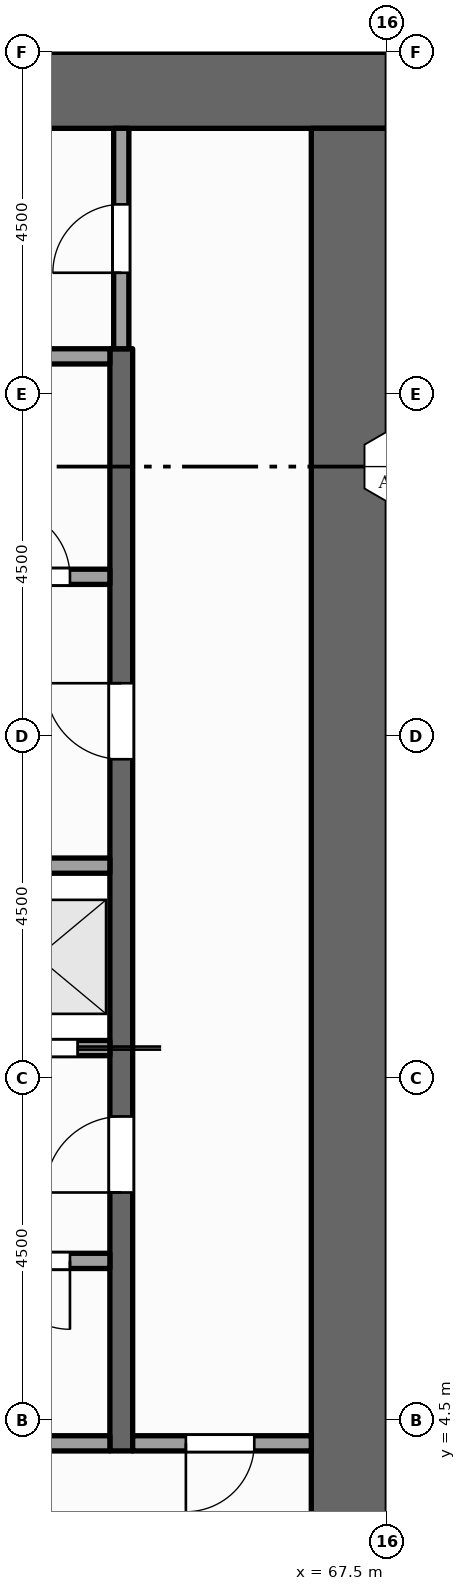
"""IFC4 building model, lengths in metres.
Left out: names, types, materials, properties, quantities, classifications, styles, units other than length and angle.
Written with IfcOpenShell. Run it as: python <this file> out.ifc"""

import sys

from ifc_helpers import new_model, si_unit, direction, frame, frame_2d, origin, place, context, subcontext, project, spatial, rectangle, extrude, element, fill, save


model = new_model("IFC4")
c1 = context("Model", 3, precision=1e-05, world=origin(), true_north=direction((0.0, 1.0)))
c2 = subcontext(c1, "Body", "Model", "MODEL_VIEW")
j1 = project(units=[si_unit("LENGTHUNIT", "METRE"), si_unit("PLANEANGLEUNIT", "RADIAN")], contexts=[c1])
p1 = place(None, origin())
s1 = spatial("IfcSite", under=j1, at=p1, CompositionType="ELEMENT")
p2 = place(p1, origin())
s2 = spatial("IfcBuilding", under=s1, at=p2, CompositionType="ELEMENT")
p3 = place(p2, frame((0.0, 0.0, 187.0)))
s3 = spatial("IfcBuildingStorey", under=s2, at=p3, CompositionType="ELEMENT", Elevation=187.0)
p4 = place(p3, frame((54.0, 22.0, -0.15), z_axis=(0.0, 0.0, 1.0), x_axis=(1.0, 0.0, 0.0)))
e1 = element("IfcWall", 1, at=p4, inside=s3, PredefinedType="SHEAR", context=c2, shape_type="SweptSolid", body=[
    extrude(rectangle(XDim=13.5, YDim=1.0, at=frame_2d((6.75, 0.0))), origin(), (0.0, 0.0, 1.0), 8.0),
])
p5 = place(p3, frame((67.0, 1.0, -0.15), z_axis=(0.0, 0.0, 1.0), x_axis=(0.0, 1.0, 0.0)))
e2 = element("IfcWall", 2, at=p5, inside=s3, PredefinedType="SHEAR", context=c2, shape_type="SweptSolid", body=[
    extrude(rectangle(XDim=20.5, YDim=1.0, at=frame_2d((10.25, 0.0))), origin(), (0.0, 0.0, 1.0), 8.0),
])
p6 = place(p3, frame((64.0, 4.1, 0.0), z_axis=(0.0, 0.0, 1.0), x_axis=(0.0, 1.0, 0.0)))
e3 = element("IfcWall", 3, at=p6, inside=s3, PredefinedType="SHEAR", context=c2, shape_type="SweptSolid", body=[
    extrude(rectangle(XDim=14.5, YDim=0.3, at=frame_2d((7.25, 0.0))), origin(), (0.0, 0.0, 1.0), 7.85),
])
p7 = place(p6, frame((3.4, 0.0, 0.0)))
e4 = element("IfcOpeningElement", 4, at=p7, cuts=e3, PredefinedType="OPENING", context=c2, shape_type="SweptSolid", body=[
    extrude(rectangle(XDim=1.0, YDim=2.1, at=frame_2d((0.5, 1.05))), frame((0.0, 0.16, 0.0), z_axis=(0.0, -1.0, 0.0), x_axis=(1.0, 0.0, 0.0)), (0.0, 0.0, 1.0), 0.32),
])
p8 = place(p6, frame((9.1, 0.0, 0.0)))
e5 = element("IfcOpeningElement", 5, at=p8, cuts=e3, PredefinedType="OPENING", context=c2, shape_type="SweptSolid", body=[
    extrude(rectangle(XDim=1.0, YDim=2.1, at=frame_2d((0.5, 1.05))), frame((0.0, 0.16, 0.0), z_axis=(0.0, -1.0, 0.0), x_axis=(1.0, 0.0, 0.0)), (0.0, 0.0, 1.0), 0.32),
])
p9 = place(p3, frame((64.0, 18.6, 0.0), z_axis=(0.0, 0.0, 1.0), x_axis=(0.0, 1.0, 0.0)))
e6 = element("IfcWall", 6, at=p9, inside=s3, PredefinedType="PARTITIONING", context=c2, shape_type="SweptSolid", body=[
    extrude(rectangle(XDim=2.9, YDim=0.2, at=frame_2d((1.45, 0.0))), origin(), (0.0, 0.0, 1.0), 7.85),
])
p10 = place(p9, frame((1.0, 0.0, 0.0)))
e7 = element("IfcOpeningElement", 7, at=p10, cuts=e6, PredefinedType="OPENING", context=c2, shape_type="SweptSolid", body=[
    extrude(rectangle(XDim=0.9, YDim=2.1, at=frame_2d((0.45, 1.05))), frame((0.0, 0.11, 0.0), z_axis=(0.0, -1.0, 0.0), x_axis=(1.0, 0.0, 0.0)), (0.0, 0.0, 1.0), 0.22),
])
p11 = place(p3, frame((61.9, 4.2, 0.0), z_axis=(0.0, 0.0, 1.0), x_axis=(1.0, 0.0, 0.0)))
e8 = element("IfcWall", 8, at=p11, inside=s3, PredefinedType="PARTITIONING", context=c2, shape_type="SweptSolid", body=[
    extrude(rectangle(XDim=1.95, YDim=0.2, at=frame_2d((0.975, 0.0))), origin(), (0.0, 0.0, 1.0), 7.85),
])
p12 = place(p3, frame((64.15, 4.2, 0.0), z_axis=(0.0, 0.0, 1.0), x_axis=(1.0, 0.0, 0.0)))
e9 = element("IfcWall", 9, at=p12, inside=s3, PredefinedType="PARTITIONING", context=c2, shape_type="SweptSolid", body=[
    extrude(rectangle(XDim=2.35, YDim=0.2, at=frame_2d((1.175, 0.0))), origin(), (0.0, 0.0, 1.0), 7.85),
])
p13 = place(p12, frame((0.7, 0.0, 0.0)))
e10 = element("IfcOpeningElement", 10, at=p13, cuts=e9, PredefinedType="OPENING", context=c2, shape_type="SweptSolid", body=[
    extrude(rectangle(XDim=0.9, YDim=2.1, at=frame_2d((0.45, 1.05))), frame((0.0, 0.11, 0.0), z_axis=(0.0, -1.0, 0.0), x_axis=(1.0, 0.0, 0.0)), (0.0, 0.0, 1.0), 0.22),
])
p14 = place(p3, frame((61.9, 6.6, 0.0), z_axis=(0.0, 0.0, 1.0), x_axis=(1.0, 0.0, 0.0)))
e11 = element("IfcWall", 11, at=p14, inside=s3, PredefinedType="PARTITIONING", context=c2, shape_type="SweptSolid", body=[
    extrude(rectangle(XDim=1.95, YDim=0.2, at=frame_2d((0.975, 0.0))), origin(), (0.0, 0.0, 1.0), 7.85),
])
p15 = place(p14, frame((0.525, 0.0, 0.0)))
e12 = element("IfcOpeningElement", 12, at=p15, cuts=e11, PredefinedType="OPENING", context=c2, shape_type="SweptSolid", body=[
    extrude(rectangle(XDim=0.9, YDim=2.1, at=frame_2d((0.45, 1.05))), frame((0.0, 0.11, 0.0), z_axis=(0.0, -1.0, 0.0), x_axis=(1.0, 0.0, 0.0)), (0.0, 0.0, 1.0), 0.22),
])
p16 = place(p3, frame((61.9, 9.4, 0.0), z_axis=(0.0, 0.0, 1.0), x_axis=(1.0, 0.0, 0.0)))
e13 = element("IfcWall", 13, at=p16, inside=s3, PredefinedType="SOLIDWALL", context=c2, shape_type="SweptSolid", body=[
    extrude(rectangle(XDim=1.95, YDim=0.2, at=frame_2d((0.975, 0.0))), origin(), (0.0, 0.0, 1.0), 7.85),
])
p17 = place(p16, frame((0.425, 0.0, 0.012)))
e14 = element("IfcOpeningElement", 14, at=p17, cuts=e13, PredefinedType="OPENING", context=c2, shape_type="SweptSolid", body=[
    extrude(rectangle(XDim=1.1, YDim=2.1, at=frame_2d((0.55, 1.05))), frame((0.0, 0.11, 0.0), z_axis=(0.0, -1.0, 0.0), x_axis=(1.0, 0.0, 0.0)), (0.0, 0.0, 1.0), 0.22),
])
p18 = place(p3, frame((61.9, 11.8, 0.0), z_axis=(0.0, 0.0, 1.0), x_axis=(1.0, 0.0, 0.0)))
e15 = element("IfcWall", 15, at=p18, inside=s3, PredefinedType="SOLIDWALL", context=c2, shape_type="SweptSolid", body=[
    extrude(rectangle(XDim=1.95, YDim=0.2, at=frame_2d((0.975, 0.0))), origin(), (0.0, 0.0, 1.0), 7.85),
])
p19 = place(p3, frame((61.9, 15.6, 0.0), z_axis=(0.0, 0.0, 1.0), x_axis=(1.0, 0.0, 0.0)))
e16 = element("IfcWall", 16, at=p19, inside=s3, PredefinedType="PARTITIONING", context=c2, shape_type="SweptSolid", body=[
    extrude(rectangle(XDim=1.95, YDim=0.2, at=frame_2d((0.975, 0.0))), origin(), (0.0, 0.0, 1.0), 7.85),
])
p20 = place(p19, frame((0.525, 0.0, 0.0)))
e17 = element("IfcOpeningElement", 17, at=p20, cuts=e16, PredefinedType="OPENING", context=c2, shape_type="SweptSolid", body=[
    extrude(rectangle(XDim=0.9, YDim=2.1, at=frame_2d((0.45, 1.05))), frame((0.0, 0.11, 0.0), z_axis=(0.0, -1.0, 0.0), x_axis=(1.0, 0.0, 0.0)), (0.0, 0.0, 1.0), 0.22),
])
p21 = place(p3, frame((61.9, 18.5, 0.0), z_axis=(0.0, 0.0, 1.0), x_axis=(1.0, 0.0, 0.0)))
e18 = element("IfcWall", 18, at=p21, inside=s3, PredefinedType="PARTITIONING", context=c2, shape_type="SweptSolid", body=[
    extrude(rectangle(XDim=1.95, YDim=0.2, at=frame_2d((0.975, 0.0))), origin(), (0.0, 0.0, 1.0), 7.85),
])
p22 = place(p17, origin())
e19 = element("IfcDoor", 19, at=p22, inside=s3, OperationType="SLIDING_TO_RIGHT", PredefinedType="DOOR", context=c2, shape_type="SweptSolid", body=[
    extrude(rectangle(XDim=1.1, YDim=2.1, at=frame_2d((0.55, 1.05))), frame((0.0, 0.025, 0.0), z_axis=(0.0, -1.0, 0.0), x_axis=(1.0, 0.0, 0.0)), (0.0, 0.0, 1.0), 0.05),
])
fill(e14, e19)
p23 = place(p7, origin())
e20 = element("IfcDoor", 20, at=p23, inside=s3, OperationType="SINGLE_SWING_LEFT", PredefinedType="DOOR", context=c2, shape_type="SweptSolid", body=[
    extrude(rectangle(XDim=1.0, YDim=2.1, at=frame_2d((0.5, 1.05))), frame((0.0, 0.025, 0.0), z_axis=(0.0, -1.0, 0.0), x_axis=(1.0, 0.0, 0.0)), (0.0, 0.0, 1.0), 0.05),
])
fill(e4, e20)
p24 = place(p8, origin())
e21 = element("IfcDoor", 21, at=p24, inside=s3, OperationType="SINGLE_SWING_RIGHT", PredefinedType="DOOR", context=c2, shape_type="SweptSolid", body=[
    extrude(rectangle(XDim=1.0, YDim=2.1, at=frame_2d((0.5, 1.05))), frame((0.0, 0.025, 0.0), z_axis=(0.0, -1.0, 0.0), x_axis=(1.0, 0.0, 0.0)), (0.0, 0.0, 1.0), 0.05),
])
fill(e5, e21)
p25 = place(p13, origin())
e22 = element("IfcDoor", 22, at=p25, inside=s3, OperationType="SINGLE_SWING_LEFT", PredefinedType="DOOR", context=c2, shape_type="SweptSolid", body=[
    extrude(rectangle(XDim=0.9, YDim=2.1, at=frame_2d((0.45, 1.05))), frame((0.0, 0.025, 0.0), z_axis=(0.0, -1.0, 0.0), x_axis=(1.0, 0.0, 0.0)), (0.0, 0.0, 1.0), 0.05),
])
fill(e10, e22)
p26 = place(p10, origin())
e23 = element("IfcDoor", 23, at=p26, inside=s3, OperationType="SINGLE_SWING_LEFT", PredefinedType="DOOR", context=c2, shape_type="SweptSolid", body=[
    extrude(rectangle(XDim=0.9, YDim=2.1, at=frame_2d((0.45, 1.05))), frame((0.0, 0.025, 0.0), z_axis=(0.0, -1.0, 0.0), x_axis=(1.0, 0.0, 0.0)), (0.0, 0.0, 1.0), 0.05),
])
fill(e7, e23)
p27 = place(p15, origin())
e24 = element("IfcDoor", 24, at=p27, inside=s3, OperationType="SINGLE_SWING_RIGHT", PredefinedType="DOOR", context=c2, shape_type="SweptSolid", body=[
    extrude(rectangle(XDim=0.9, YDim=2.1, at=frame_2d((0.45, 1.05))), frame((0.0, 0.025, 0.0), z_axis=(0.0, -1.0, 0.0), x_axis=(1.0, 0.0, 0.0)), (0.0, 0.0, 1.0), 0.05),
])
fill(e12, e24)
p28 = place(p20, origin())
e25 = element("IfcDoor", 25, at=p28, inside=s3, OperationType="SINGLE_SWING_LEFT", PredefinedType="DOOR", context=c2, shape_type="SweptSolid", body=[
    extrude(rectangle(XDim=0.9, YDim=2.1, at=frame_2d((0.45, 1.05))), frame((0.0, 0.025, 0.0), z_axis=(0.0, -1.0, 0.0), x_axis=(1.0, 0.0, 0.0)), (0.0, 0.0, 1.0), 0.05),
])
fill(e17, e25)
save(model, sys.argv[1])
